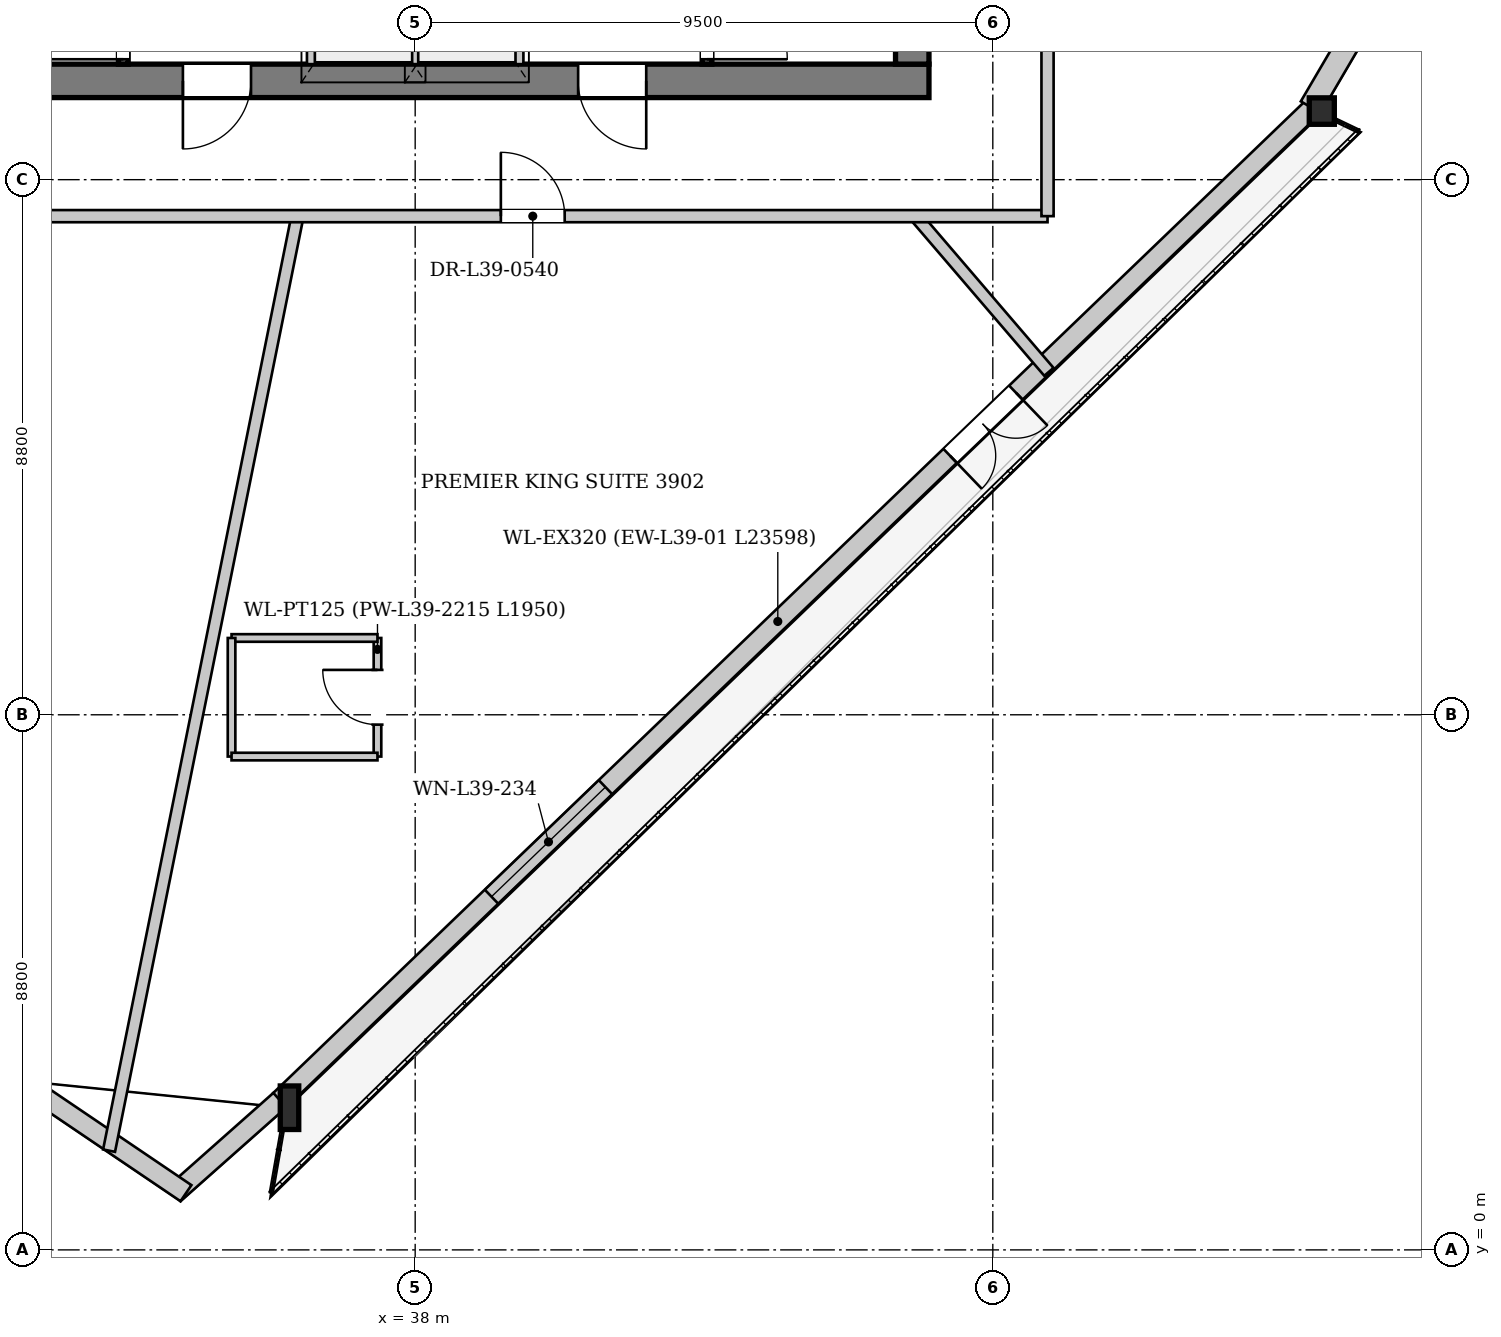
"""IFC4 building model, lengths in metres.
Left out: names, types, materials, properties, quantities, classifications, styles, units other than length and angle.
Written with IfcOpenShell. Run it as: python <this file> out.ifc"""

import sys

from ifc_helpers import new_model, si_unit, direction, frame, frame_2d, origin, origin_2d, place, context, subcontext, project, spatial, rectangle, i_section, extrude, source, transform, mapped, element, fill, save


model = new_model("IFC4")
c1 = context("Model", 3, precision=1e-05, world=origin(), true_north=direction((0.0, 1.0)))
c2 = subcontext(c1, "Body", "Model", "MODEL_VIEW")
j1 = project(units=[si_unit("LENGTHUNIT", "METRE"), si_unit("PLANEANGLEUNIT", "RADIAN")], contexts=[c1])
p1 = place(None, origin())
s1 = spatial("IfcSite", under=j1, at=p1, CompositionType="ELEMENT")
p2 = place(p1, origin())
s2 = spatial("IfcBuilding", under=s1, at=p2, CompositionType="ELEMENT")
p3 = place(p2, frame((0.0, 0.0, 150.15)))
s3 = spatial("IfcBuildingStorey", under=s2, at=p3, CompositionType="ELEMENT", Elevation=150.15)
m1 = source(origin(), c2, "Body", "SweptSolid", [
    extrude(i_section(OverallWidth=0.304, OverallDepth=0.716, WebThickness=0.021, FlangeThickness=0.04, at=origin_2d()), origin(), (0.0, 0.0, 1.0), 3.387),
])
p4 = place(p3, frame((35.88, 2.343, 0.0), z_axis=(0.03128640428, -0.002667274098, 0.999506901705), x_axis=(0.084945317377, 0.996385614637, 0.0)))
e1 = element("IfcColumn", 1, at=p4, inside=s3, PredefinedType="COLUMN", context=c2, shape_type="MappedRepresentation", body=[
    mapped(m1, transform((0.0, 0.0, 0.0), x_axis=(1.0, 0.0, 0.0), y_axis=(0.0, 1.0, 0.0), z_axis=(0.0, 0.0, 1.0), scale=1.0)),
])
m2 = source(origin(), c2, "Body", "SweptSolid", [
    extrude(i_section(OverallWidth=0.412, OverallDepth=0.435, WebThickness=0.031, FlangeThickness=0.05, at=origin_2d()), origin(), (0.0, 0.0, 1.0), 3.386),
])
p5 = place(p3, frame((52.893, 18.696, 0.0), z_axis=(0.010167095003, 0.019180477098, 0.999764341971), x_axis=(-0.883545410781, 0.468345499699, 0.0)))
e2 = element("IfcColumn", 2, at=p5, inside=s3, PredefinedType="COLUMN", context=c2, shape_type="MappedRepresentation", body=[
    mapped(m2, transform((0.0, 0.0, 0.0), x_axis=(1.0, 0.0, 0.0), y_axis=(0.0, 1.0, 0.0), z_axis=(0.0, 0.0, 1.0), scale=1.0)),
])
p6 = place(p3, frame((52.782, 18.811, 0.0), z_axis=(0.0, 0.0, 1.0), x_axis=(-0.720961083524, -0.69297555227, 0.0)))
e3 = element("IfcWall", 3, at=p6, inside=s3, PredefinedType="SOLIDWALL", context=c2, shape_type="SweptSolid", body=[
    extrude(rectangle(XDim=23.598, YDim=0.32, at=frame_2d((11.799, 0.0))), origin(), (0.0, 0.0, 1.0), 2.692),
])
p7 = place(p6, frame((6.801, 0.0, 0.0)))
e4 = element("IfcOpeningElement", 4, at=p7, cuts=e3, PredefinedType="OPENING", context=c2, shape_type="SweptSolid", body=[
    extrude(rectangle(XDim=1.5, YDim=2.3, at=frame_2d((0.75, 1.15))), frame((0.0, 0.17, 0.0), z_axis=(0.0, -1.0, 0.0), x_axis=(1.0, 0.0, 0.0)), (0.0, 0.0, 1.0), 0.34),
])
p8 = place(p6, frame((16.163, 0.0, 0.25)))
e5 = element("IfcOpeningElement", 5, at=p8, cuts=e3, PredefinedType="OPENING", context=c2, shape_type="SweptSolid", body=[
    extrude(rectangle(XDim=2.6, YDim=2.35, at=frame_2d((1.3, 1.175))), frame((0.0, 0.17, 0.0), z_axis=(0.0, -1.0, 0.0), x_axis=(1.0, 0.0, 0.0)), (0.0, 0.0, 1.0), 0.34),
])
p9 = place(p3, frame((35.774, 2.462, 0.0), z_axis=(0.0, 0.0, 1.0), x_axis=(-0.748162084796, -0.663516009509, 0.0)))
e6 = element("IfcWall", 6, at=p9, inside=s3, PredefinedType="SOLIDWALL", context=c2, shape_type="SweptSolid", body=[
    extrude(rectangle(XDim=2.325, YDim=0.32, at=frame_2d((1.162, 0.0))), origin(), (0.0, 0.0, 1.0), 2.692),
])
p10 = place(p3, frame((34.23, 0.933, 0.0), z_axis=(0.0, 0.0, 1.0), x_axis=(-0.8280940066, 0.560589258043, 0.0)))
e7 = element("IfcWall", 7, at=p10, inside=s3, PredefinedType="SOLIDWALL", context=c2, shape_type="SweptSolid", body=[
    extrude(rectangle(XDim=3.608, YDim=0.32, at=frame_2d((1.804, 0.0))), origin(), (0.0, 0.0, 1.0), 2.692),
])
p11 = place(p3, frame((64.659, 39.152, 0.0), z_axis=(0.0, 0.0, 1.0), x_axis=(-0.505535489227, -0.862805811949, 0.0)))
e8 = element("IfcWall", 8, at=p11, inside=s3, PredefinedType="SOLIDWALL", context=c2, shape_type="SweptSolid", body=[
    extrude(rectangle(XDim=23.598, YDim=0.38, at=frame_2d((11.799, 0.0))), origin(), (0.0, 0.0, 1.0), 2.692),
])
p12 = place(p11, frame((5.507, 0.0, 0.322)))
e9 = element("IfcOpeningElement", 9, at=p12, cuts=e8, PredefinedType="OPENING", context=c2, shape_type="SweptSolid", body=[
    extrude(rectangle(XDim=2.2, YDim=2.25, at=frame_2d((1.1, 1.125))), frame((0.0, 0.2, 0.0), z_axis=(0.0, -1.0, 0.0), x_axis=(1.0, 0.0, 0.0)), (0.0, 0.0, 1.0), 0.4),
])
p13 = place(p11, frame((15.891, 0.0, 0.322)))
e10 = element("IfcOpeningElement", 10, at=p13, cuts=e8, PredefinedType="OPENING", context=c2, shape_type="SweptSolid", body=[
    extrude(rectangle(XDim=2.2, YDim=2.25, at=frame_2d((1.1, 1.125))), frame((0.0, 0.2, 0.0), z_axis=(0.0, -1.0, 0.0), x_axis=(1.0, 0.0, 0.0)), (0.0, 0.0, 1.0), 0.4),
])
p14 = place(p3, frame((46.45, 19.225, 0.0), z_axis=(0.0, 0.0, 1.0), x_axis=(-1.0, 0.0, 0.0)))
e11 = element("IfcWall", 11, at=p14, inside=s3, PredefinedType="SHEAR", context=c2, shape_type="SweptSolid", body=[
    extrude(rectangle(XDim=16.9, YDim=0.55, at=frame_2d((8.45, 0.0))), origin(), (0.0, 0.0, 1.0), 3.3),
])
p15 = place(p14, frame((4.65, 0.0, 0.0)))
e12 = element("IfcOpeningElement", 12, at=p15, cuts=e11, PredefinedType="OPENING", context=c2, shape_type="SweptSolid", body=[
    extrude(rectangle(XDim=1.12, YDim=2.25, at=frame_2d((0.56, 1.125))), frame((0.0, 0.285, 0.0), z_axis=(0.0, -1.0, 0.0), x_axis=(1.0, 0.0, 0.0)), (0.0, 0.0, 1.0), 0.57),
])
p16 = place(p14, frame((11.15, 0.0, 0.0)))
e13 = element("IfcOpeningElement", 13, at=p16, cuts=e11, PredefinedType="OPENING", context=c2, shape_type="SweptSolid", body=[
    extrude(rectangle(XDim=1.12, YDim=2.25, at=frame_2d((0.56, 1.125))), frame((0.0, 0.285, 0.0), z_axis=(0.0, -1.0, 0.0), x_axis=(1.0, 0.0, 0.0)), (0.0, 0.0, 1.0), 0.57),
])
p17 = place(p3, frame((46.175, 33.7, 0.0), z_axis=(0.0, 0.0, 1.0), x_axis=(0.0, -1.0, 0.0)))
e14 = element("IfcWall", 14, at=p17, inside=s3, PredefinedType="SHEAR", context=c2, shape_type="SweptSolid", body=[
    extrude(rectangle(XDim=14.2, YDim=0.55, at=frame_2d((7.1, 0.0))), origin(), (0.0, 0.0, 1.0), 3.3),
])
p18 = place(p17, frame((5.18, 0.0, 0.0)))
e15 = element("IfcOpeningElement", 15, at=p18, cuts=e14, PredefinedType="OPENING", context=c2, shape_type="SweptSolid", body=[
    extrude(rectangle(XDim=1.6, YDim=2.2, at=frame_2d((0.8, 1.1))), frame((0.0, 0.285, 0.0), z_axis=(0.0, -1.0, 0.0), x_axis=(1.0, 0.0, 0.0)), (0.0, 0.0, 1.0), 0.57),
])
p19 = place(p17, frame((2.05, 0.0, 0.0)))
e16 = element("IfcOpeningElement", 16, at=p19, cuts=e14, PredefinedType="OPENING", context=c2, shape_type="SweptSolid", body=[
    extrude(rectangle(XDim=0.95, YDim=2.1, at=frame_2d((0.475, 1.05))), frame((0.0, 0.285, 0.0), z_axis=(0.0, -1.0, 0.0), x_axis=(1.0, 0.0, 0.0)), (0.0, 0.0, 1.0), 0.57),
])
p20 = place(p3, frame((33.2, 19.5, 0.0), z_axis=(0.0, 0.0, 1.0), x_axis=(0.0, 1.0, 0.0)))
e17 = element("IfcWall", 17, at=p20, inside=s3, PredefinedType="PARTITIONING", context=c2, shape_type="SweptSolid", body=[
    extrude(rectangle(XDim=7.46, YDim=0.16, at=frame_2d((3.73, 0.0))), origin(), (0.0, 0.0, 1.0), 3.3),
])
p21 = place(p20, frame((0.08, 0.0, 0.0)))
e18 = element("IfcOpeningElement", 18, at=p21, cuts=e17, PredefinedType="OPENING", context=c2, shape_type="SweptSolid", body=[
    extrude(rectangle(XDim=1.32, YDim=2.2, at=frame_2d((0.66, 1.1))), frame((0.0, 0.09, 0.0), z_axis=(0.0, -1.0, 0.0), x_axis=(1.0, 0.0, 0.0)), (0.0, 0.0, 1.0), 0.18),
])
p22 = place(p3, frame((42.8, 26.96, 0.0), z_axis=(0.0, 0.0, 1.0), x_axis=(0.0, -1.0, 0.0)))
e19 = element("IfcWall", 19, at=p22, inside=s3, PredefinedType="PARTITIONING", context=c2, shape_type="SweptSolid", body=[
    extrude(rectangle(XDim=7.46, YDim=0.16, at=frame_2d((3.73, 0.0))), origin(), (0.0, 0.0, 1.0), 3.3),
])
p23 = place(p22, frame((6.06, 0.0, 0.0)))
e20 = element("IfcOpeningElement", 20, at=p23, cuts=e19, PredefinedType="OPENING", context=c2, shape_type="SweptSolid", body=[
    extrude(rectangle(XDim=1.32, YDim=2.2, at=frame_2d((0.66, 1.1))), frame((0.0, 0.09, 0.0), z_axis=(0.0, -1.0, 0.0), x_axis=(1.0, 0.0, 0.0)), (0.0, 0.0, 1.0), 0.18),
])
p24 = place(p3, frame((36.3, 19.5, 0.0), z_axis=(0.0, 0.0, 1.0), x_axis=(0.0, 1.0, 0.0)))
e21 = element("IfcWall", 21, at=p24, inside=s3, PredefinedType="PARTITIONING", context=c2, shape_type="SweptSolid", body=[
    extrude(rectangle(XDim=4.78, YDim=0.16, at=frame_2d((2.39, 0.0))), origin(), (0.0, 0.0, 1.0), 3.3),
])
p25 = place(p24, frame((0.6, 0.0, 0.0)))
e22 = element("IfcOpeningElement", 22, at=p25, cuts=e21, PredefinedType="OPENING", context=c2, shape_type="SweptSolid", body=[
    extrude(rectangle(XDim=1.2, YDim=2.2, at=frame_2d((0.6, 1.1))), frame((0.0, 0.09, 0.0), z_axis=(0.0, -1.0, 0.0), x_axis=(1.0, 0.0, 0.0)), (0.0, 0.0, 1.0), 0.18),
])
p26 = place(p24, frame((2.65, 0.0, 0.0)))
e23 = element("IfcOpeningElement", 23, at=p26, cuts=e21, PredefinedType="OPENING", context=c2, shape_type="SweptSolid", body=[
    extrude(rectangle(XDim=0.95, YDim=2.1, at=frame_2d((0.475, 1.05))), frame((0.0, 0.09, 0.0), z_axis=(0.0, -1.0, 0.0), x_axis=(1.0, 0.0, 0.0)), (0.0, 0.0, 1.0), 0.18),
])
p27 = place(p3, frame((39.7, 24.28, 0.0), z_axis=(0.0, 0.0, 1.0), x_axis=(0.0, -1.0, 0.0)))
e24 = element("IfcWall", 24, at=p27, inside=s3, PredefinedType="PARTITIONING", context=c2, shape_type="SweptSolid", body=[
    extrude(rectangle(XDim=4.78, YDim=0.16, at=frame_2d((2.39, 0.0))), origin(), (0.0, 0.0, 1.0), 3.3),
])
p28 = place(p27, frame((3.12, 0.0, 0.0)))
e25 = element("IfcOpeningElement", 25, at=p28, cuts=e24, PredefinedType="OPENING", context=c2, shape_type="SweptSolid", body=[
    extrude(rectangle(XDim=1.2, YDim=2.2, at=frame_2d((0.6, 1.1))), frame((0.0, 0.09, 0.0), z_axis=(0.0, -1.0, 0.0), x_axis=(1.0, 0.0, 0.0)), (0.0, 0.0, 1.0), 0.18),
])
p29 = place(p3, frame((38.0, 19.5, 0.0), z_axis=(0.0, 0.0, 1.0), x_axis=(0.0, 1.0, 0.0)))
e26 = element("IfcWall", 26, at=p29, inside=s3, PredefinedType="PARTITIONING", context=c2, shape_type="SweptSolid", body=[
    extrude(rectangle(XDim=2.46, YDim=0.125, at=frame_2d((1.23, 0.0))), origin(), (0.0, 0.0, 1.0), 3.3),
])
p30 = place(p3, frame((36.064, 17.0, 0.0), z_axis=(0.0, 0.0, 1.0), x_axis=(-0.197649211277, -0.980272813701, 0.0)))
e27 = element("IfcWall", 27, at=p30, inside=s3, PredefinedType="PARTITIONING", context=c2, shape_type="SweptSolid", body=[
    extrude(rectangle(XDim=15.677, YDim=0.2, at=frame_2d((7.839, 0.0))), origin(), (0.0, 0.0, 1.0), 3.3),
])
p31 = place(p3, frame((46.228, 17.0, 0.0), z_axis=(0.0, 0.0, 1.0), x_axis=(0.650755597275, -0.759287266201, 0.0)))
e28 = element("IfcWall", 28, at=p31, inside=s3, PredefinedType="PARTITIONING", context=c2, shape_type="SweptSolid", body=[
    extrude(rectangle(XDim=3.372, YDim=0.2, at=frame_2d((1.686, 0.0))), origin(), (0.0, 0.0, 1.0), 3.3),
])
p32 = place(p3, frame((37.38, 8.113, 0.0), z_axis=(0.0, 0.0, 1.0), x_axis=(0.0, 1.0, 0.0)))
e29 = element("IfcWall", 29, at=p32, inside=s3, PredefinedType="PARTITIONING", context=c2, shape_type="SweptSolid", body=[
    extrude(rectangle(XDim=1.95, YDim=0.125, at=frame_2d((0.975, 0.0))), origin(), (0.0, 0.0, 1.0), 3.3),
])
p33 = place(p32, frame((0.525, 0.0, 0.0)))
e30 = element("IfcOpeningElement", 30, at=p33, cuts=e29, PredefinedType="OPENING", context=c2, shape_type="SweptSolid", body=[
    extrude(rectangle(XDim=0.9, YDim=2.1, at=frame_2d((0.45, 1.05))), frame((0.0, 0.073, 0.0), z_axis=(0.0, -1.0, 0.0), x_axis=(1.0, 0.0, 0.0)), (0.0, 0.0, 1.0), 0.145),
])
p34 = place(p3, frame((37.38, 10.063, 0.0), z_axis=(0.0, 0.0, 1.0), x_axis=(-1.0, 0.0, 0.0)))
e31 = element("IfcWall", 31, at=p34, inside=s3, PredefinedType="PARTITIONING", context=c2, shape_type="SweptSolid", body=[
    extrude(rectangle(XDim=2.4, YDim=0.125, at=frame_2d((1.2, 0.0))), origin(), (0.0, 0.0, 1.0), 3.3),
])
p35 = place(p3, frame((34.98, 10.063, 0.0), z_axis=(0.0, 0.0, 1.0), x_axis=(0.0, -1.0, 0.0)))
e32 = element("IfcWall", 32, at=p35, inside=s3, PredefinedType="PARTITIONING", context=c2, shape_type="SweptSolid", body=[
    extrude(rectangle(XDim=1.95, YDim=0.125, at=frame_2d((0.975, 0.0))), origin(), (0.0, 0.0, 1.0), 2.895),
])
p36 = place(p3, frame((34.98, 8.113, 0.0), z_axis=(0.0, 0.0, 1.0), x_axis=(1.0, 0.0, 0.0)))
e33 = element("IfcWall", 33, at=p36, inside=s3, PredefinedType="PARTITIONING", context=c2, shape_type="SweptSolid", body=[
    extrude(rectangle(XDim=2.4, YDim=0.125, at=frame_2d((1.2, 0.0))), origin(), (0.0, 0.0, 1.0), 3.3),
])
p37 = place(p3, frame((27.6, 17.0, 0.0), z_axis=(0.0, 0.0, 1.0), x_axis=(1.0, 0.0, 0.0)))
e34 = element("IfcWall", 34, at=p37, inside=s3, PredefinedType="PARTITIONING", context=c2, shape_type="SweptSolid", body=[
    extrude(rectangle(XDim=20.8, YDim=0.2, at=frame_2d((10.4, 0.0))), origin(), (0.0, 0.0, 1.0), 3.3),
])
p38 = place(p37, frame((11.809, 0.0, 0.0)))
e35 = element("IfcOpeningElement", 35, at=p38, cuts=e34, PredefinedType="OPENING", context=c2, shape_type="SweptSolid", body=[
    extrude(rectangle(XDim=1.05, YDim=2.2, at=frame_2d((0.525, 1.1))), frame((0.0, 0.11, 0.0), z_axis=(0.0, -1.0, 0.0), x_axis=(1.0, 0.0, 0.0)), (0.0, 0.0, 1.0), 0.22),
])
p39 = place(p3, frame((48.4, 17.0, 0.0), z_axis=(0.0, 0.0, 1.0), x_axis=(0.0, 1.0, 0.0)))
e36 = element("IfcWall", 36, at=p39, inside=s3, PredefinedType="PARTITIONING", context=c2, shape_type="SweptSolid", body=[
    extrude(rectangle(XDim=19.2, YDim=0.2, at=frame_2d((9.6, 0.0))), origin(), (0.0, 0.0, 1.0), 3.3),
])
p40 = place(p39, frame((3.625, 0.0, 0.0)))
e37 = element("IfcOpeningElement", 37, at=p40, cuts=e36, PredefinedType="OPENING", context=c2, shape_type="SweptSolid", body=[
    extrude(rectangle(XDim=1.05, YDim=2.2, at=frame_2d((0.525, 1.1))), frame((0.0, 0.11, 0.0), z_axis=(0.0, -1.0, 0.0), x_axis=(1.0, 0.0, 0.0)), (0.0, 0.0, 1.0), 0.22),
])
p41 = place(p39, frame((13.976, 0.0, 0.0)))
e38 = element("IfcOpeningElement", 38, at=p41, cuts=e36, PredefinedType="OPENING", context=c2, shape_type="SweptSolid", body=[
    extrude(rectangle(XDim=1.05, YDim=2.2, at=frame_2d((0.525, 1.1))), frame((0.0, 0.11, 0.0), z_axis=(0.0, -1.0, 0.0), x_axis=(1.0, 0.0, 0.0)), (0.0, 0.0, 1.0), 0.22),
])
m3 = source(origin(), c2, "Body", "SweptSolid", [
    extrude(rectangle(XDim=1.5, YDim=2.3, at=frame_2d((0.75, 1.15))), frame((0.0, 0.025, 0.0), z_axis=(0.0, -1.0, 0.0), x_axis=(1.0, 0.0, 0.0)), (0.0, 0.0, 1.0), 0.05),
])
p42 = place(p7, origin())
e39 = element("IfcDoor", 39, at=p42, inside=s3, OperationType="DOUBLE_DOOR_SINGLE_SWING", PredefinedType="DOOR", context=c2, shape_type="MappedRepresentation", body=[
    mapped(m3, transform((0.0, 0.0, 0.0), x_axis=(1.0, 0.0, 0.0), y_axis=(0.0, 1.0, 0.0), z_axis=(0.0, 0.0, 1.0), scale=1.0)),
])
fill(e4, e39)
m4 = source(origin(), c2, "Body", "SweptSolid", [
    extrude(rectangle(XDim=2.6, YDim=2.35, at=frame_2d((1.3, 1.175))), frame((0.0, 0.03, 0.0), z_axis=(0.0, -1.0, 0.0), x_axis=(1.0, 0.0, 0.0)), (0.0, 0.0, 1.0), 0.06),
])
p43 = place(p8, origin())
e40 = element("IfcWindow", 40, at=p43, inside=s3, PartitioningType="SINGLE_PANEL", PredefinedType="WINDOW", context=c2, shape_type="MappedRepresentation", body=[
    mapped(m4, transform((0.0, 0.0, 0.0), x_axis=(1.0, 0.0, 0.0), y_axis=(0.0, 1.0, 0.0), z_axis=(0.0, 0.0, 1.0), scale=1.0)),
])
fill(e5, e40)
m5 = source(origin(), c2, "Body", "SweptSolid", [
    extrude(rectangle(XDim=1.12, YDim=2.25, at=frame_2d((0.56, 1.125))), frame((0.0, 0.025, 0.0), z_axis=(0.0, -1.0, 0.0), x_axis=(1.0, 0.0, 0.0)), (0.0, 0.0, 1.0), 0.05),
])
p44 = place(p15, origin())
e41 = element("IfcDoor", 41, at=p44, inside=s3, OperationType="SINGLE_SWING_LEFT", PredefinedType="DOOR", context=c2, shape_type="MappedRepresentation", body=[
    mapped(m5, transform((0.0, 0.0, 0.0), x_axis=(1.0, 0.0, 0.0), y_axis=(0.0, 1.0, 0.0), z_axis=(0.0, 0.0, 1.0), scale=1.0)),
])
fill(e12, e41)
p45 = place(p16, origin())
e42 = element("IfcDoor", 42, at=p45, inside=s3, OperationType="SINGLE_SWING_RIGHT", PredefinedType="DOOR", context=c2, shape_type="MappedRepresentation", body=[
    mapped(m5, transform((0.0, 0.0, 0.0), x_axis=(1.0, 0.0, 0.0), y_axis=(0.0, 1.0, 0.0), z_axis=(0.0, 0.0, 1.0), scale=1.0)),
])
fill(e13, e42)
m6 = source(origin(), c2, "Body", "SweptSolid", [
    extrude(rectangle(XDim=1.32, YDim=2.2, at=frame_2d((0.66, 1.1))), frame((0.0, 0.025, 0.0), z_axis=(0.0, -1.0, 0.0), x_axis=(1.0, 0.0, 0.0)), (0.0, 0.0, 1.0), 0.05),
])
p46 = place(p21, origin())
e43 = element("IfcDoor", 43, at=p46, inside=s3, OperationType="SINGLE_SWING_LEFT", PredefinedType="DOOR", context=c2, shape_type="MappedRepresentation", body=[
    mapped(m6, transform((0.0, 0.0, 0.0), x_axis=(1.0, 0.0, 0.0), y_axis=(0.0, 1.0, 0.0), z_axis=(0.0, 0.0, 1.0), scale=1.0)),
])
fill(e18, e43)
p47 = place(p23, origin())
e44 = element("IfcDoor", 44, at=p47, inside=s3, OperationType="SINGLE_SWING_RIGHT", PredefinedType="DOOR", context=c2, shape_type="MappedRepresentation", body=[
    mapped(m6, transform((0.0, 0.0, 0.0), x_axis=(1.0, 0.0, 0.0), y_axis=(0.0, 1.0, 0.0), z_axis=(0.0, 0.0, 1.0), scale=1.0)),
])
fill(e20, e44)
m7 = source(origin(), c2, "Body", "SweptSolid", [
    extrude(rectangle(XDim=0.9, YDim=2.1, at=frame_2d((0.45, 1.05))), frame((0.0, 0.025, 0.0), z_axis=(0.0, -1.0, 0.0), x_axis=(1.0, 0.0, 0.0)), (0.0, 0.0, 1.0), 0.05),
])
p48 = place(p33, origin())
e45 = element("IfcDoor", 45, at=p48, inside=s3, OperationType="SINGLE_SWING_RIGHT", PredefinedType="DOOR", context=c2, shape_type="MappedRepresentation", body=[
    mapped(m7, transform((0.0, 0.0, 0.0), x_axis=(1.0, 0.0, 0.0), y_axis=(0.0, 1.0, 0.0), z_axis=(0.0, 0.0, 1.0), scale=1.0)),
])
fill(e30, e45)
m8 = source(origin(), c2, "Body", "SweptSolid", [
    extrude(rectangle(XDim=1.05, YDim=2.2, at=frame_2d((0.525, 1.1))), frame((0.0, 0.025, 0.0), z_axis=(0.0, -1.0, 0.0), x_axis=(1.0, 0.0, 0.0)), (0.0, 0.0, 1.0), 0.05),
])
p49 = place(p38, origin())
e46 = element("IfcDoor", 46, at=p49, inside=s3, OperationType="SINGLE_SWING_LEFT", PredefinedType="DOOR", context=c2, shape_type="MappedRepresentation", body=[
    mapped(m8, transform((0.0, 0.0, 0.0), x_axis=(1.0, 0.0, 0.0), y_axis=(0.0, 1.0, 0.0), z_axis=(0.0, 0.0, 1.0), scale=1.0)),
])
fill(e35, e46)
save(model, sys.argv[1])
